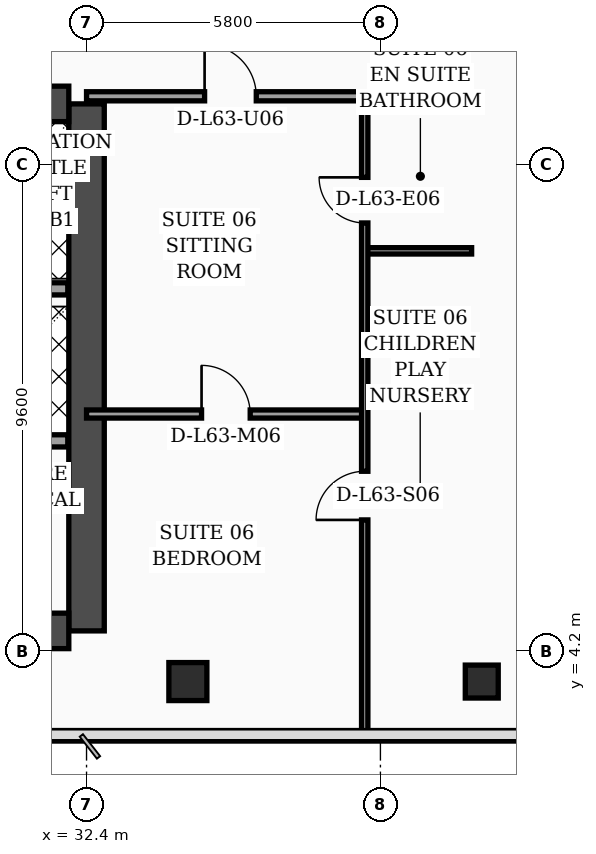
"""IFC4 building model, lengths in metres.
Left out: names, types, materials, properties, quantities, classifications, styles, units other than length and angle.
Written with IfcOpenShell. Run it as: python <this file> out.ifc"""

import sys

from ifc_helpers import new_model, si_unit, direction, frame, frame_2d, origin, origin_2d, place, context, subcontext, project, spatial, rectangle, hollow_rectangle, extrude, element, fill, save


model = new_model("IFC4")
c1 = context("Model", 3, precision=1e-05, world=origin(), true_north=direction((0.0, 1.0)))
c2 = subcontext(c1, "Body", "Model", "MODEL_VIEW")
j1 = project(units=[si_unit("LENGTHUNIT", "METRE"), si_unit("PLANEANGLEUNIT", "RADIAN")], contexts=[c1])
p1 = place(None, origin())
s1 = spatial("IfcSite", under=j1, at=p1, CompositionType="ELEMENT")
p2 = place(p1, origin())
s2 = spatial("IfcBuilding", under=s1, at=p2, CompositionType="ELEMENT")
p3 = place(p2, frame((0.0, 0.0, 255.2)))
s3 = spatial("IfcBuildingStorey", under=s2, at=p3, CompositionType="ELEMENT", Elevation=255.2)
p4 = place(p3, frame((32.4, 4.6, 0.0), z_axis=(0.0, 0.0, 1.0), x_axis=(0.0, 1.0, 0.0)))
e1 = element("IfcWall", 1, at=p4, inside=s3, PredefinedType="SHEAR", context=c2, shape_type="SweptSolid", body=[
    extrude(rectangle(XDim=10.4, YDim=0.7, at=frame_2d((5.2, 0.0))), origin(), (0.0, 0.0, 1.0), 3.56),
])
p5 = place(p3, frame((21.95, 15.0, 0.0), z_axis=(0.0, 0.0, 1.0), x_axis=(1.0, 0.0, 0.0)))
e2 = element("IfcWall", 2, at=p5, inside=s3, PredefinedType="SHEAR", context=c2, shape_type="SweptSolid", body=[
    extrude(rectangle(XDim=10.1, YDim=0.7, at=frame_2d((5.05, 0.0))), origin(), (0.0, 0.0, 1.0), 3.56),
])
p6 = place(p5, frame((4.95, 0.0, 0.0)))
e3 = element("IfcOpeningElement", 3, at=p6, cuts=e2, PredefinedType="OPENING", context=c2, shape_type="SweptSolid", body=[
    extrude(rectangle(XDim=1.1, YDim=2.2, at=frame_2d((0.55, 1.1))), frame((0.0, 0.36, 0.0), z_axis=(0.0, -1.0, 0.0), x_axis=(1.0, 0.0, 0.0)), (0.0, 0.0, 1.0), 0.72),
])
p7 = place(p3, frame((21.95, 4.6, 0.0), z_axis=(0.0, 0.0, 1.0), x_axis=(1.0, 0.0, 0.0)))
e4 = element("IfcWall", 4, at=p7, inside=s3, PredefinedType="SHEAR", context=c2, shape_type="SweptSolid", body=[
    extrude(rectangle(XDim=10.1, YDim=0.7, at=frame_2d((5.05, 0.0))), origin(), (0.0, 0.0, 1.0), 3.56),
])
p8 = place(p3, frame((34.4, 3.6, 0.0), z_axis=(0.0, 0.0, 1.0), x_axis=(1.0, 0.0, 0.0)))
e5 = element("IfcColumn", 5, at=p8, inside=s3, PredefinedType="COLUMN", context=c2, shape_type="SweptSolid", body=[
    extrude(hollow_rectangle(XDim=0.75, YDim=0.75, WallThickness=0.032, at=origin_2d()), origin(), (0.0, 0.0, 1.0), 3.56),
])
p9 = place(p3, frame((40.2, 3.6, 0.0), z_axis=(0.0, 0.0, 1.0), x_axis=(1.0, 0.0, 0.0)))
e6 = element("IfcColumn", 6, at=p9, inside=s3, PredefinedType="COLUMN", context=c2, shape_type="SweptSolid", body=[
    extrude(hollow_rectangle(XDim=0.65, YDim=0.65, WallThickness=0.028, at=origin_2d()), origin(), (0.0, 0.0, 1.0), 3.56),
])
p10 = place(p3, frame((46.63, 5.505, 0.0), z_axis=(0.0, 0.0, 1.0), x_axis=(-0.300501856448, 0.953781229775, 0.0)))
e7 = element("IfcWall", 7, at=p10, inside=s3, PredefinedType="SOLIDWALL", context=c2, shape_type="SweptSolid", body=[
    extrude(rectangle(XDim=30.814, YDim=0.32, at=frame_2d((15.407, 0.0))), origin(), (0.0, 0.0, 1.0), 3.56),
])
p11 = place(p10, frame((18.796, 0.0, 0.0)))
e8 = element("IfcOpeningElement", 8, at=p11, cuts=e7, PredefinedType="OPENING", context=c2, shape_type="SweptSolid", body=[
    extrude(rectangle(XDim=1.4, YDim=2.25, at=frame_2d((0.7, 1.125))), frame((0.0, 0.17, 0.0), z_axis=(0.0, -1.0, 0.0), x_axis=(1.0, 0.0, 0.0)), (0.0, 0.0, 1.0), 0.34),
])
p12 = place(p10, frame((4.437, 0.0, 0.7)))
e9 = element("IfcOpeningElement", 9, at=p12, cuts=e7, PredefinedType="OPENING", context=c2, shape_type="SweptSolid", body=[
    extrude(rectangle(XDim=1.6, YDim=1.65, at=frame_2d((0.8, 0.825))), frame((0.0, 0.17, 0.0), z_axis=(0.0, -1.0, 0.0), x_axis=(1.0, 0.0, 0.0)), (0.0, 0.0, 1.0), 0.34),
])
p13 = place(p10, frame((9.889, 0.0, 0.7)))
e10 = element("IfcOpeningElement", 10, at=p13, cuts=e7, PredefinedType="OPENING", context=c2, shape_type="SweptSolid", body=[
    extrude(rectangle(XDim=1.6, YDim=1.65, at=frame_2d((0.8, 0.825))), frame((0.0, 0.17, 0.0), z_axis=(0.0, -1.0, 0.0), x_axis=(1.0, 0.0, 0.0)), (0.0, 0.0, 1.0), 0.34),
])
p14 = place(p10, frame((1.6, 0.0, 0.75)))
e11 = element("IfcOpeningElement", 11, at=p14, cuts=e7, PredefinedType="OPENING", context=c2, shape_type="SweptSolid", body=[
    extrude(rectangle(XDim=1.5, YDim=1.6, at=frame_2d((0.75, 0.8))), frame((0.0, 0.17, 0.0), z_axis=(0.0, -1.0, 0.0), x_axis=(1.0, 0.0, 0.0)), (0.0, 0.0, 1.0), 0.34),
])
p15 = place(p10, frame((7.8, 0.0, 0.75)))
e12 = element("IfcOpeningElement", 12, at=p15, cuts=e7, PredefinedType="OPENING", context=c2, shape_type="SweptSolid", body=[
    extrude(rectangle(XDim=1.5, YDim=1.6, at=frame_2d((0.75, 0.8))), frame((0.0, 0.17, 0.0), z_axis=(0.0, -1.0, 0.0), x_axis=(1.0, 0.0, 0.0)), (0.0, 0.0, 1.0), 0.34),
])
p16 = place(p10, frame((11.95, 0.0, 0.75)))
e13 = element("IfcOpeningElement", 13, at=p16, cuts=e7, PredefinedType="OPENING", context=c2, shape_type="SweptSolid", body=[
    extrude(rectangle(XDim=1.5, YDim=1.6, at=frame_2d((0.75, 0.8))), frame((0.0, 0.17, 0.0), z_axis=(0.0, -1.0, 0.0), x_axis=(1.0, 0.0, 0.0)), (0.0, 0.0, 1.0), 0.34),
])
p17 = place(p10, frame((14.0, 0.0, 0.75)))
e14 = element("IfcOpeningElement", 14, at=p17, cuts=e7, PredefinedType="OPENING", context=c2, shape_type="SweptSolid", body=[
    extrude(rectangle(XDim=1.5, YDim=1.6, at=frame_2d((0.75, 0.8))), frame((0.0, 0.17, 0.0), z_axis=(0.0, -1.0, 0.0), x_axis=(1.0, 0.0, 0.0)), (0.0, 0.0, 1.0), 0.34),
])
p18 = place(p10, frame((16.55, 0.0, 0.75)))
e15 = element("IfcOpeningElement", 15, at=p18, cuts=e7, PredefinedType="OPENING", context=c2, shape_type="SweptSolid", body=[
    extrude(rectangle(XDim=1.5, YDim=1.6, at=frame_2d((0.75, 0.8))), frame((0.0, 0.17, 0.0), z_axis=(0.0, -1.0, 0.0), x_axis=(1.0, 0.0, 0.0)), (0.0, 0.0, 1.0), 0.34),
])
p19 = place(p10, frame((20.75, 0.0, 0.75)))
e16 = element("IfcOpeningElement", 16, at=p19, cuts=e7, PredefinedType="OPENING", context=c2, shape_type="SweptSolid", body=[
    extrude(rectangle(XDim=1.5, YDim=1.6, at=frame_2d((0.75, 0.8))), frame((0.0, 0.17, 0.0), z_axis=(0.0, -1.0, 0.0), x_axis=(1.0, 0.0, 0.0)), (0.0, 0.0, 1.0), 0.34),
])
p20 = place(p10, frame((23.3, 0.0, 0.75)))
e17 = element("IfcOpeningElement", 17, at=p20, cuts=e7, PredefinedType="OPENING", context=c2, shape_type="SweptSolid", body=[
    extrude(rectangle(XDim=1.5, YDim=1.6, at=frame_2d((0.75, 0.8))), frame((0.0, 0.17, 0.0), z_axis=(0.0, -1.0, 0.0), x_axis=(1.0, 0.0, 0.0)), (0.0, 0.0, 1.0), 0.34),
])
p21 = place(p10, frame((26.4, 0.0, 0.75)))
e18 = element("IfcOpeningElement", 18, at=p21, cuts=e7, PredefinedType="OPENING", context=c2, shape_type="SweptSolid", body=[
    extrude(rectangle(XDim=1.5, YDim=1.6, at=frame_2d((0.75, 0.8))), frame((0.0, 0.17, 0.0), z_axis=(0.0, -1.0, 0.0), x_axis=(1.0, 0.0, 0.0)), (0.0, 0.0, 1.0), 0.34),
])
p22 = place(p3, frame((27.02, 11.35, 0.0), z_axis=(0.0, 0.0, 1.0), x_axis=(1.0, 0.0, 0.0)))
e19 = element("IfcWall", 19, at=p22, inside=s3, PredefinedType="SOLIDWALL", context=c2, shape_type="SweptSolid", body=[
    extrude(rectangle(XDim=5.01, YDim=0.24, at=frame_2d((2.505, 0.0))), origin(), (0.0, 0.0, 1.0), 3.56),
])
p23 = place(p22, frame((0.45, 0.0, 0.0)))
e20 = element("IfcOpeningElement", 20, at=p23, cuts=e19, PredefinedType="OPENING", context=c2, shape_type="SweptSolid", body=[
    extrude(rectangle(XDim=1.3, YDim=2.35, at=frame_2d((0.65, 1.175))), frame((0.0, 0.13, 0.0), z_axis=(0.0, -1.0, 0.0), x_axis=(1.0, 0.0, 0.0)), (0.0, 0.0, 1.0), 0.26),
])
p24 = place(p3, frame((27.02, 8.35, 0.0), z_axis=(0.0, 0.0, 1.0), x_axis=(1.0, 0.0, 0.0)))
e21 = element("IfcWall", 21, at=p24, inside=s3, PredefinedType="SOLIDWALL", context=c2, shape_type="SweptSolid", body=[
    extrude(rectangle(XDim=5.01, YDim=0.24, at=frame_2d((2.505, 0.0))), origin(), (0.0, 0.0, 1.0), 3.56),
])
p25 = place(p3, frame((37.89, 12.1, 0.0), z_axis=(0.0, 0.0, 1.0), x_axis=(1.0, 0.0, 0.0)))
e22 = element("IfcWall", 22, at=p25, inside=s3, PredefinedType="PARTITIONING", context=c2, shape_type="SweptSolid", body=[
    extrude(rectangle(XDim=2.11, YDim=0.125, at=frame_2d((1.055, 0.0))), origin(), (0.0, 0.0, 1.0), 3.56),
])
p26 = place(p3, frame((32.4, 8.88, 0.0), z_axis=(0.0, 0.0, 1.0), x_axis=(1.0, 0.0, 0.0)))
e23 = element("IfcWall", 23, at=p26, inside=s3, PredefinedType="PARTITIONING", context=c2, shape_type="SweptSolid", body=[
    extrude(rectangle(XDim=5.49, YDim=0.16, at=frame_2d((2.745, 0.0))), origin(), (0.0, 0.0, 1.0), 2.99),
])
p27 = place(p26, frame((2.27, 0.0, 0.0)))
e24 = element("IfcOpeningElement", 24, at=p27, cuts=e23, PredefinedType="OPENING", context=c2, shape_type="SweptSolid", body=[
    extrude(rectangle(XDim=0.96, YDim=2.2, at=frame_2d((0.48, 1.1))), frame((0.0, 0.09, 0.0), z_axis=(0.0, -1.0, 0.0), x_axis=(1.0, 0.0, 0.0)), (0.0, 0.0, 1.0), 0.18),
])
p28 = place(p3, frame((37.89, 2.44, 0.0), z_axis=(0.0, 0.0, 1.0), x_axis=(0.0, 1.0, 0.0)))
e25 = element("IfcWall", 25, at=p28, inside=s3, PredefinedType="PARTITIONING", context=c2, shape_type="SweptSolid", body=[
    extrude(rectangle(XDim=12.71, YDim=0.125, at=frame_2d((6.355, 0.0))), origin(), (0.0, 0.0, 1.0), 2.99),
])
p29 = place(p28, frame((4.35, 0.0, 0.0)))
e26 = element("IfcOpeningElement", 26, at=p29, cuts=e25, PredefinedType="OPENING", context=c2, shape_type="SweptSolid", body=[
    extrude(rectangle(XDim=0.96, YDim=2.2, at=frame_2d((0.48, 1.1))), frame((0.0, 0.073, 0.0), z_axis=(0.0, -1.0, 0.0), x_axis=(1.0, 0.0, 0.0)), (0.0, 0.0, 1.0), 0.145),
])
p30 = place(p28, frame((10.21, 0.0, 0.0)))
e27 = element("IfcOpeningElement", 27, at=p30, cuts=e25, PredefinedType="OPENING", context=c2, shape_type="SweptSolid", body=[
    extrude(rectangle(XDim=0.9, YDim=2.15, at=frame_2d((0.45, 1.075))), frame((0.0, 0.073, 0.0), z_axis=(0.0, -1.0, 0.0), x_axis=(1.0, 0.0, 0.0)), (0.0, 0.0, 1.0), 0.145),
])
p31 = place(p3, frame((32.4, 15.15, 0.0), z_axis=(0.0, 0.0, 1.0), x_axis=(1.0, 0.0, 0.0)))
e28 = element("IfcWall", 28, at=p31, inside=s3, PredefinedType="PARTITIONING", context=c2, shape_type="SweptSolid", body=[
    extrude(rectangle(XDim=7.6, YDim=0.18, at=frame_2d((3.8, 0.0))), origin(), (0.0, 0.0, 1.0), 2.99),
])
p32 = place(p31, frame((2.33, 0.0, 0.0)))
e29 = element("IfcOpeningElement", 29, at=p32, cuts=e28, PredefinedType="OPENING", context=c2, shape_type="SweptSolid", body=[
    extrude(rectangle(XDim=1.02, YDim=2.2, at=frame_2d((0.51, 1.1))), frame((0.0, 0.1, 0.0), z_axis=(0.0, -1.0, 0.0), x_axis=(1.0, 0.0, 0.0)), (0.0, 0.0, 1.0), 0.2),
])
p33 = place(p27, origin())
e30 = element("IfcDoor", 30, at=p33, inside=s3, OperationType="SINGLE_SWING_LEFT", PredefinedType="DOOR", context=c2, shape_type="SweptSolid", body=[
    extrude(rectangle(XDim=0.96, YDim=2.2, at=frame_2d((0.48, 1.1))), frame((0.0, 0.025, 0.0), z_axis=(0.0, -1.0, 0.0), x_axis=(1.0, 0.0, 0.0)), (0.0, 0.0, 1.0), 0.05),
])
fill(e24, e30)
p34 = place(p29, origin())
e31 = element("IfcDoor", 31, at=p34, inside=s3, OperationType="SINGLE_SWING_LEFT", PredefinedType="DOOR", context=c2, shape_type="SweptSolid", body=[
    extrude(rectangle(XDim=0.96, YDim=2.2, at=frame_2d((0.48, 1.1))), frame((0.0, 0.025, 0.0), z_axis=(0.0, -1.0, 0.0), x_axis=(1.0, 0.0, 0.0)), (0.0, 0.0, 1.0), 0.05),
])
fill(e26, e31)
p35 = place(p30, origin())
e32 = element("IfcDoor", 32, at=p35, inside=s3, OperationType="SINGLE_SWING_RIGHT", PredefinedType="DOOR", context=c2, shape_type="SweptSolid", body=[
    extrude(rectangle(XDim=0.9, YDim=2.15, at=frame_2d((0.45, 1.075))), frame((0.0, 0.025, 0.0), z_axis=(0.0, -1.0, 0.0), x_axis=(1.0, 0.0, 0.0)), (0.0, 0.0, 1.0), 0.05),
])
fill(e27, e32)
p36 = place(p32, origin())
e33 = element("IfcDoor", 33, at=p36, inside=s3, OperationType="SINGLE_SWING_LEFT", PredefinedType="DOOR", context=c2, shape_type="SweptSolid", body=[
    extrude(rectangle(XDim=1.02, YDim=2.2, at=frame_2d((0.51, 1.1))), frame((0.0, 0.025, 0.0), z_axis=(0.0, -1.0, 0.0), x_axis=(1.0, 0.0, 0.0)), (0.0, 0.0, 1.0), 0.05),
])
fill(e29, e33)
save(model, sys.argv[1])
